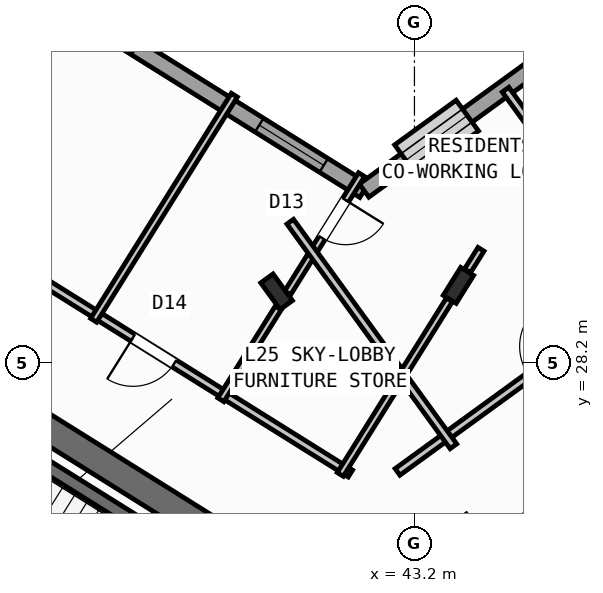
"""IFC4 building model, lengths in metres.
Left out: names, types, materials, properties, quantities, classifications, styles, units other than length and angle.
Written with IfcOpenShell. Run it as: python <this file> out.ifc"""

import sys

from ifc_helpers import new_model, si_unit, direction, frame, frame_2d, origin, origin_2d, place, context, subcontext, project, spatial, rectangle, i_section, extrude, source, transform, mapped, element, fill, save


model = new_model("IFC4")
c1 = context("Model", 3, precision=1e-05, world=origin(), true_north=direction((0.0, 1.0)))
c2 = subcontext(c1, "Body", "Model", "MODEL_VIEW")
j1 = project(units=[si_unit("LENGTHUNIT", "METRE"), si_unit("PLANEANGLEUNIT", "RADIAN")], contexts=[c1])
p1 = place(None, origin())
s1 = spatial("IfcSite", under=j1, at=p1, CompositionType="ELEMENT")
p2 = place(p1, origin())
s2 = spatial("IfcBuilding", under=s1, at=p2, CompositionType="ELEMENT")
p3 = place(p2, frame((0.0, 0.0, 100.8)))
s3 = spatial("IfcBuildingStorey", under=s2, at=p3, CompositionType="ELEMENT", Elevation=100.8)
p4 = place(p3, frame((40.573, 24.01, 0.0), z_axis=(0.0, 0.0, 1.0), x_axis=(-0.848047359947, 0.529920442413, 0.0)))
e1 = element("IfcWall", 1, at=p4, inside=s3, PredefinedType="SHEAR", context=c2, shape_type="SweptSolid", body=[
    extrude(rectangle(XDim=13.14, YDim=0.55, at=frame_2d((6.57, 0.0))), origin(), (0.0, 0.0, 1.0), 4.25),
])
p5 = place(p3, frame((44.365, 24.142, 0.0), z_axis=(0.0, 0.0, 1.0), x_axis=(0.809024304885, 0.587775190107, 0.0)))
e2 = element("IfcWall", 2, at=p5, inside=s3, PredefinedType="SHEAR", context=c2, shape_type="SweptSolid", body=[
    extrude(rectangle(XDim=12.34, YDim=0.55, at=frame_2d((6.17, 0.0))), origin(), (0.0, 0.0, 1.0), 4.25),
])
m1 = source(origin(), c2, "Body", "SweptSolid", [
    extrude(i_section(OverallWidth=0.3, OverallDepth=0.65, WebThickness=0.016, FlangeThickness=0.031, at=origin_2d()), origin(), (0.0, 0.0, 1.0), 4.5),
])
for number, where, z_axis, x_axis in (
    (3, (44.068, 29.726, 0.0), (0.0, 0.0, 1.0), (-0.848, 0.53, 0.0)),
    (4, (40.479, 29.601, 0.0), (0.0, 0.0, 1.0), (0.809, 0.588, 0.0)),
):
    element("IfcColumn", number, at=place(p3, frame(where, z_axis=z_axis, x_axis=x_axis)), inside=s3, PredefinedType="COLUMN", context=c2, shape_type="MappedRepresentation", body=[
        mapped(m1, transform((0.0, 0.0, 0.0), scale=1.0)),
    ])
p6 = place(p3, frame((17.424, 47.083, 0.0), z_axis=(0.0, 0.0, 1.0), x_axis=(0.848049927979, -0.529916332693, 0.0)))
e5 = element("IfcWall", 5, at=p6, inside=s3, PredefinedType="STANDARD", context=c2, shape_type="SweptSolid", body=[
    extrude(rectangle(XDim=29.223, YDim=0.32, at=frame_2d((14.612, 0.0))), origin(), (0.0, 0.0, 1.0), 4.25),
])
p7 = place(p6, frame((10.072, 0.0, 0.0)))
e6 = element("IfcOpeningElement", 6, at=p7, cuts=e5, PredefinedType="OPENING", context=c2, shape_type="SweptSolid", body=[
    extrude(rectangle(XDim=1.05, YDim=2.15, at=frame_2d((0.525, 1.075))), frame((0.0, 0.17, 0.0), z_axis=(0.0, -1.0, 0.0), x_axis=(1.0, 0.0, 0.0)), (0.0, 0.0, 1.0), 0.34),
])
p8 = place(p6, frame((0.869, 0.0, 0.85)))
e7 = element("IfcOpeningElement", 7, at=p8, cuts=e5, PredefinedType="OPENING", context=c2, shape_type="SweptSolid", body=[
    extrude(rectangle(XDim=1.5, YDim=1.5, at=frame_2d((0.75, 0.75))), frame((0.0, 0.17, 0.0), z_axis=(0.0, -1.0, 0.0), x_axis=(1.0, 0.0, 0.0)), (0.0, 0.0, 1.0), 0.34),
])
p9 = place(p6, frame((3.981, 0.0, 0.85)))
e8 = element("IfcOpeningElement", 8, at=p9, cuts=e5, PredefinedType="OPENING", context=c2, shape_type="SweptSolid", body=[
    extrude(rectangle(XDim=1.5, YDim=1.5, at=frame_2d((0.75, 0.75))), frame((0.0, 0.17, 0.0), z_axis=(0.0, -1.0, 0.0), x_axis=(1.0, 0.0, 0.0)), (0.0, 0.0, 1.0), 0.34),
])
p10 = place(p6, frame((13.739, 0.0, 0.85)))
e9 = element("IfcOpeningElement", 9, at=p10, cuts=e5, PredefinedType="OPENING", context=c2, shape_type="SweptSolid", body=[
    extrude(rectangle(XDim=1.5, YDim=1.5, at=frame_2d((0.75, 0.75))), frame((0.0, 0.17, 0.0), z_axis=(0.0, -1.0, 0.0), x_axis=(1.0, 0.0, 0.0)), (0.0, 0.0, 1.0), 0.34),
])
p11 = place(p6, frame((21.114, 0.0, 0.65)))
e10 = element("IfcOpeningElement", 10, at=p11, cuts=e5, PredefinedType="OPENING", context=c2, shape_type="SweptSolid", body=[
    extrude(rectangle(XDim=2.8, YDim=2.1, at=frame_2d((1.4, 1.05))), frame((0.0, 0.17, 0.0), z_axis=(0.0, -1.0, 0.0), x_axis=(1.0, 0.0, 0.0)), (0.0, 0.0, 1.0), 0.34),
])
p12 = place(p6, frame((26.784, 0.0, 0.85)))
e11 = element("IfcOpeningElement", 11, at=p12, cuts=e5, PredefinedType="OPENING", context=c2, shape_type="SweptSolid", body=[
    extrude(rectangle(XDim=1.5, YDim=1.5, at=frame_2d((0.75, 0.75))), frame((0.0, 0.17, 0.0), z_axis=(0.0, -1.0, 0.0), x_axis=(1.0, 0.0, 0.0)), (0.0, 0.0, 1.0), 0.34),
])
p13 = place(p3, frame((42.207, 31.597, 0.0), z_axis=(0.0, 0.0, 1.0), x_axis=(0.809020333377, 0.587780656523, 0.0)))
e12 = element("IfcWall", 12, at=p13, inside=s3, PredefinedType="STANDARD", context=c2, shape_type="SweptSolid", body=[
    extrude(rectangle(XDim=15.223, YDim=0.32, at=frame_2d((7.611, 0.0))), origin(), (0.0, 0.0, 1.0), 4.25),
])
p14 = place(p13, frame((12.82, 0.0, 0.0)))
e13 = element("IfcOpeningElement", 13, at=p14, cuts=e12, PredefinedType="OPENING", context=c2, shape_type="SweptSolid", body=[
    extrude(rectangle(XDim=1.05, YDim=2.15, at=frame_2d((0.525, 1.075))), frame((0.0, 0.17, 0.0), z_axis=(0.0, -1.0, 0.0), x_axis=(1.0, 0.0, 0.0)), (0.0, 0.0, 1.0), 0.34),
])
p15 = place(p13, frame((1.018, 0.0, 0.85)))
e14 = element("IfcOpeningElement", 14, at=p15, cuts=e12, PredefinedType="OPENING", context=c2, shape_type="SweptSolid", body=[
    extrude(rectangle(XDim=1.5, YDim=1.5, at=frame_2d((0.75, 0.75))), frame((0.0, 0.17, 0.0), z_axis=(0.0, -1.0, 0.0), x_axis=(1.0, 0.0, 0.0)), (0.0, 0.0, 1.0), 0.34),
])
p16 = place(p13, frame((5.394, 0.0, 0.8)))
e15 = element("IfcOpeningElement", 15, at=p16, cuts=e12, PredefinedType="OPENING", context=c2, shape_type="SweptSolid", body=[
    extrude(rectangle(XDim=2.1, YDim=1.55, at=frame_2d((1.05, 0.775))), frame((0.0, 0.17, 0.0), z_axis=(0.0, -1.0, 0.0), x_axis=(1.0, 0.0, 0.0)), (0.0, 0.0, 1.0), 0.34),
])
p17 = place(p3, frame((39.721, 23.788, 0.0), z_axis=(0.0, 0.0, 1.0), x_axis=(-0.848054434086, 0.529909121291, 0.0)))
e16 = element("IfcWall", 16, at=p17, inside=s3, PredefinedType="SHEAR", context=c2, shape_type="SweptSolid", body=[
    extrude(rectangle(XDim=7.33, YDim=0.26, at=frame_2d((3.665, 0.0))), origin(), (0.0, 0.0, 1.0), 4.25),
])
p18 = place(p3, frame((41.936, 26.012, 0.0), z_axis=(0.0, 0.0, 1.0), x_axis=(-0.848051154596, 0.529914369676, 0.0)))
e17 = element("IfcWall", 17, at=p18, inside=s3, PredefinedType="PARTITIONING", context=c2, shape_type="SweptSolid", body=[
    extrude(rectangle(XDim=15.57, YDim=0.16, at=frame_2d((7.785, 0.0))), origin(), (0.0, 0.0, 1.0), 4.24),
])
p19 = place(p18, frame((4.1, 0.0, 0.0)))
e18 = element("IfcOpeningElement", 18, at=p19, cuts=e17, PredefinedType="OPENING", context=c2, shape_type="SweptSolid", body=[
    extrude(rectangle(XDim=0.96, YDim=2.08, at=frame_2d((0.48, 1.04))), frame((0.0, 0.09, 0.0), z_axis=(0.0, -1.0, 0.0), x_axis=(1.0, 0.0, 0.0)), (0.0, 0.0, 1.0), 0.18),
])
p20 = place(p18, frame((8.2, 0.0, 0.0)))
e19 = element("IfcOpeningElement", 19, at=p20, cuts=e17, PredefinedType="OPENING", context=c2, shape_type="SweptSolid", body=[
    extrude(rectangle(XDim=1.7, YDim=2.2, at=frame_2d((0.85, 1.1))), frame((0.0, 0.09, 0.0), z_axis=(0.0, -1.0, 0.0), x_axis=(1.0, 0.0, 0.0)), (0.0, 0.0, 1.0), 0.18),
])
p21 = place(p3, frame((42.156, 31.912, 0.0), z_axis=(0.0, 0.0, 1.0), x_axis=(-0.529943141103, -0.848033175765, 0.0)))
e20 = element("IfcWall", 20, at=p21, inside=s3, PredefinedType="PLUMBINGWALL", context=c2, shape_type="SweptSolid", body=[
    extrude(rectangle(XDim=2.753, YDim=0.14, at=frame_2d((1.376, 0.0))), origin(), (0.0, 0.0, 1.0), 3.735),
])
p22 = place(p21, frame((0.593, 0.0, 0.0)))
e21 = element("IfcOpeningElement", 21, at=p22, cuts=e20, PredefinedType="OPENING", context=c2, shape_type="SweptSolid", body=[
    extrude(rectangle(XDim=0.88, YDim=2.08, at=frame_2d((0.44, 1.04))), frame((0.0, 0.08, 0.0), z_axis=(0.0, -1.0, 0.0), x_axis=(1.0, 0.0, 0.0)), (0.0, 0.0, 1.0), 0.16),
])
p23 = place(p3, frame((40.512, 29.281, 0.0), z_axis=(0.0, 0.0, 1.0), x_axis=(-0.529947607416, -0.848030384712, 0.0)))
e22 = element("IfcWall", 22, at=p23, inside=s3, PredefinedType="PLUMBINGWALL", context=c2, shape_type="SweptSolid", body=[
    extrude(rectangle(XDim=2.138, YDim=0.14, at=frame_2d((1.069, 0.0))), origin(), (0.0, 0.0, 1.0), 4.24),
])
p24 = place(p3, frame((44.514, 30.439, 0.0), z_axis=(0.0, 0.0, 1.0), x_axis=(-0.529824479439, -0.848107316905, 0.0)))
e23 = element("IfcWall", 23, at=p24, inside=s3, PredefinedType="PLUMBINGWALL", context=c2, shape_type="SweptSolid", body=[
    extrude(rectangle(XDim=0.503, YDim=0.14, at=frame_2d((0.251, 0.0))), origin(), (0.0, 0.0, 1.0), 4.24),
])
p25 = place(p3, frame((43.89, 29.44, 0.0), z_axis=(0.0, 0.0, 1.0), x_axis=(-0.529928721319, -0.84804218664, 0.0)))
e24 = element("IfcWall", 24, at=p25, inside=s3, PredefinedType="PLUMBINGWALL", context=c2, shape_type="SweptSolid", body=[
    extrude(rectangle(XDim=4.063, YDim=0.14, at=frame_2d((2.031, 0.0))), origin(), (0.0, 0.0, 1.0), 3.675),
])
p26 = place(p3, frame((39.646, 33.48, 0.0), z_axis=(0.0, 0.0, 1.0), x_axis=(-0.529923555071, -0.848045414928, 0.0)))
e25 = element("IfcWall", 25, at=p26, inside=s3, PredefinedType="PLUMBINGWALL", context=c2, shape_type="SweptSolid", body=[
    extrude(rectangle(XDim=5.24, YDim=0.14, at=frame_2d((2.62, 0.0))), origin(), (0.0, 0.0, 1.0), 4.24),
])
p27 = place(p3, frame((42.866, 26.044, 0.0), z_axis=(0.0, 0.0, 1.0), x_axis=(0.809020254154, 0.587780765566, 0.0)))
e26 = element("IfcWall", 26, at=p27, inside=s3, PredefinedType="PARTITIONING", context=c2, shape_type="SweptSolid", body=[
    extrude(rectangle(XDim=14.67, YDim=0.16, at=frame_2d((7.335, 0.0))), origin(), (0.0, 0.0, 1.0), 4.24),
])
p28 = place(p27, frame((3.215, 0.0, 0.0)))
e27 = element("IfcOpeningElement", 27, at=p28, cuts=e26, PredefinedType="OPENING", context=c2, shape_type="SweptSolid", body=[
    extrude(rectangle(XDim=1.0, YDim=2.1, at=frame_2d((0.5, 1.05))), frame((0.0, 0.09, 0.0), z_axis=(0.0, -1.0, 0.0), x_axis=(1.0, 0.0, 0.0)), (0.0, 0.0, 1.0), 0.18),
])
p29 = place(p27, frame((9.915, 0.0, 0.0)))
e28 = element("IfcOpeningElement", 28, at=p29, cuts=e26, PredefinedType="OPENING", context=c2, shape_type="SweptSolid", body=[
    extrude(rectangle(XDim=1.0, YDim=2.1, at=frame_2d((0.5, 1.05))), frame((0.0, 0.09, 0.0), z_axis=(0.0, -1.0, 0.0), x_axis=(1.0, 0.0, 0.0)), (0.0, 0.0, 1.0), 0.18),
])
p30 = place(p3, frame((43.969, 26.55, 0.0), z_axis=(0.0, 0.0, 1.0), x_axis=(-0.587776919386, 0.80902304852, 0.0)))
e29 = element("IfcWall", 29, at=p30, inside=s3, PredefinedType="PARTITIONING", context=c2, shape_type="SweptSolid", body=[
    extrude(rectangle(XDim=5.48, YDim=0.16, at=frame_2d((2.74, 0.0))), origin(), (0.0, 0.0, 1.0), 4.24),
])
p31 = place(p3, frame((47.849, 29.665, 0.0), z_axis=(0.0, 0.0, 1.0), x_axis=(-0.587785532001, 0.809016791155, 0.0)))
e30 = element("IfcWall", 30, at=p31, inside=s3, PredefinedType="PARTITIONING", context=c2, shape_type="SweptSolid", body=[
    extrude(rectangle(XDim=4.85, YDim=0.16, at=frame_2d((2.425, 0.0))), origin(), (0.0, 0.0, 1.0), 4.24),
])
m2 = source(origin(), c2, "Body", "SweptSolid", [
    extrude(rectangle(XDim=1.5, YDim=1.5, at=frame_2d((0.75, 0.75))), frame((0.0, 0.03, 0.0), z_axis=(0.0, -1.0, 0.0), x_axis=(1.0, 0.0, 0.0)), (0.0, 0.0, 1.0), 0.06),
])
p32 = place(p12, origin())
e31 = element("IfcWindow", 31, at=p32, inside=s3, PartitioningType="SINGLE_PANEL", PredefinedType="WINDOW", context=c2, shape_type="MappedRepresentation", body=[
    mapped(m2, transform((0.0, 0.0, 0.0), scale=1.0)),
])
fill(e11, e31)
p33 = place(p15, origin())
e32 = element("IfcWindow", 32, at=p33, inside=s3, PartitioningType="SINGLE_PANEL", PredefinedType="WINDOW", context=c2, shape_type="MappedRepresentation", body=[
    mapped(m2, transform((0.0, 0.0, 0.0), scale=1.0)),
])
fill(e14, e32)
m3 = source(origin(), c2, "Body", "SweptSolid", [
    extrude(rectangle(XDim=0.88, YDim=2.08, at=frame_2d((0.44, 1.04))), frame((0.0, 0.025, 0.0), z_axis=(0.0, -1.0, 0.0), x_axis=(1.0, 0.0, 0.0)), (0.0, 0.0, 1.0), 0.05),
])
p34 = place(p22, origin())
e33 = element("IfcDoor", 33, at=p34, inside=s3, OperationType="SINGLE_SWING_LEFT", PredefinedType="DOOR", context=c2, shape_type="MappedRepresentation", body=[
    mapped(m3, transform((0.0, 0.0, 0.0), scale=1.0)),
])
fill(e21, e33)
m4 = source(origin(), c2, "Body", "SweptSolid", [
    extrude(rectangle(XDim=0.96, YDim=2.08, at=frame_2d((0.48, 1.04))), frame((0.0, 0.025, 0.0), z_axis=(0.0, -1.0, 0.0), x_axis=(1.0, 0.0, 0.0)), (0.0, 0.0, 1.0), 0.05),
])
p35 = place(p19, origin())
e34 = element("IfcDoor", 34, at=p35, inside=s3, OperationType="SINGLE_SWING_RIGHT", PredefinedType="DOOR", context=c2, shape_type="MappedRepresentation", body=[
    mapped(m4, transform((0.0, 0.0, 0.0), scale=1.0)),
])
fill(e18, e34)
save(model, sys.argv[1])
